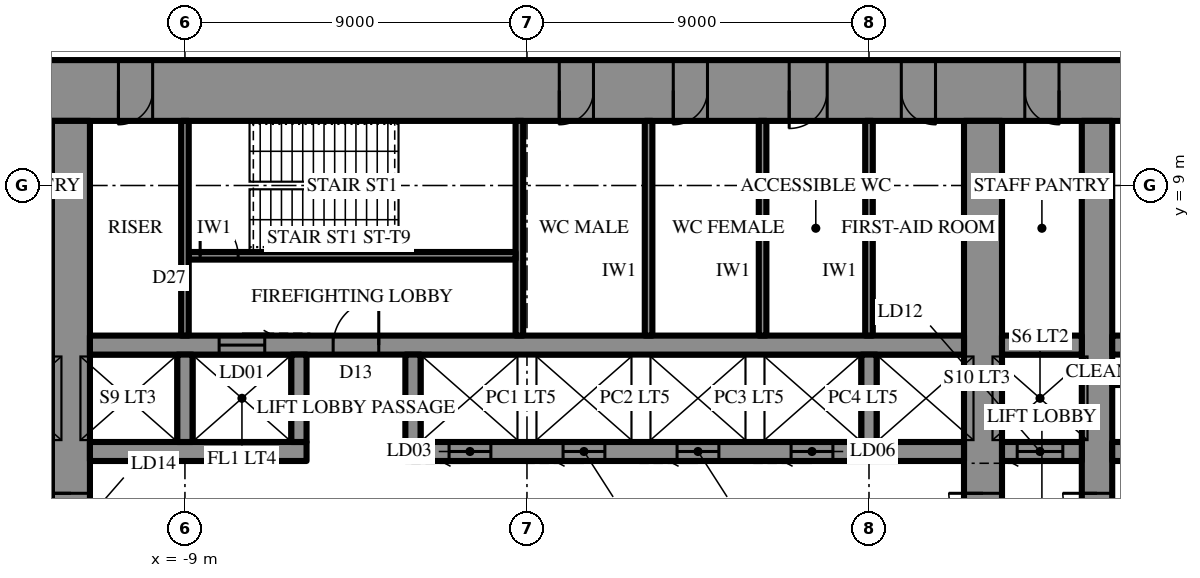
"""IFC4 building model, lengths in metres.
Left out: names, types, materials, properties, quantities, classifications, styles, units other than length and angle.
Written with IfcOpenShell. Run it as: python <this file> out.ifc"""

import sys

from ifc_helpers import new_model, si_unit, direction, frame, frame_2d, origin, place, context, subcontext, project, spatial, rectangle, extrude, element, fill, save


model = new_model("IFC4")
c1 = context("Model", 3, precision=1e-05, world=origin(), true_north=direction((0.0, 1.0)))
c2 = subcontext(c1, "Body", "Model", "MODEL_VIEW")
j1 = project(units=[si_unit("LENGTHUNIT", "METRE"), si_unit("PLANEANGLEUNIT", "RADIAN")], contexts=[c1])
p1 = place(None, origin())
s1 = spatial("IfcSite", under=j1, at=p1, CompositionType="ELEMENT")
p2 = place(p1, origin())
s2 = spatial("IfcBuilding", under=s1, at=p2, CompositionType="ELEMENT")
p3 = place(p2, frame((0.0, 0.0, 210.5)))
s3 = spatial("IfcBuildingStorey", under=s2, at=p3, CompositionType="ELEMENT", Elevation=210.5)
p4 = place(p3, frame((-18.6, 11.5, 0.0), z_axis=(0.0, 0.0, 1.0), x_axis=(1.0, 0.0, 0.0)))
e1 = element("IfcWall", 1, at=p4, inside=s3, PredefinedType="SHEAR", context=c2, shape_type="SweptSolid", body=[
    extrude(rectangle(XDim=37.2, YDim=1.6, at=frame_2d((18.6, 0.0))), origin(), (0.0, 0.0, 1.0), 5.0),
])
p5 = place(p4, frame((19.45, 0.0, 0.0)))
e2 = element("IfcOpeningElement", 2, at=p5, cuts=e1, PredefinedType="OPENING", context=c2, shape_type="SweptSolid", body=[
    extrude(rectangle(XDim=0.9, YDim=2.2, at=frame_2d((0.45, 1.1))), frame((0.0, 0.81, 0.0), z_axis=(0.0, -1.0, 0.0), x_axis=(1.0, 0.0, 0.0)), (0.0, 0.0, 1.0), 1.62),
])
p6 = place(p4, frame((22.45, 0.0, 0.0)))
e3 = element("IfcOpeningElement", 3, at=p6, cuts=e1, PredefinedType="OPENING", context=c2, shape_type="SweptSolid", body=[
    extrude(rectangle(XDim=0.9, YDim=2.2, at=frame_2d((0.45, 1.1))), frame((0.0, 0.81, 0.0), z_axis=(0.0, -1.0, 0.0), x_axis=(1.0, 0.0, 0.0)), (0.0, 0.0, 1.0), 1.62),
])
p7 = place(p4, frame((25.5, 0.0, 0.0)))
e4 = element("IfcOpeningElement", 4, at=p7, cuts=e1, PredefinedType="OPENING", context=c2, shape_type="SweptSolid", body=[
    extrude(rectangle(XDim=1.0, YDim=2.2, at=frame_2d((0.5, 1.1))), frame((0.0, 0.81, 0.0), z_axis=(0.0, -1.0, 0.0), x_axis=(1.0, 0.0, 0.0)), (0.0, 0.0, 1.0), 1.62),
])
p8 = place(p4, frame((1.75, 0.0, 0.0)))
e5 = element("IfcOpeningElement", 5, at=p8, cuts=e1, PredefinedType="OPENING", context=c2, shape_type="SweptSolid", body=[
    extrude(rectangle(XDim=0.9, YDim=2.2, at=frame_2d((0.45, 1.1))), frame((0.0, 0.81, 0.0), z_axis=(0.0, -1.0, 0.0), x_axis=(1.0, 0.0, 0.0)), (0.0, 0.0, 1.0), 1.62),
])
p9 = place(p4, frame((4.6, 0.0, 0.0)))
e6 = element("IfcOpeningElement", 6, at=p9, cuts=e1, PredefinedType="OPENING", context=c2, shape_type="SweptSolid", body=[
    extrude(rectangle(XDim=0.9, YDim=2.2, at=frame_2d((0.45, 1.1))), frame((0.0, 0.81, 0.0), z_axis=(0.0, -1.0, 0.0), x_axis=(1.0, 0.0, 0.0)), (0.0, 0.0, 1.0), 1.62),
])
p10 = place(p4, frame((7.85, 0.0, 0.0)))
e7 = element("IfcOpeningElement", 7, at=p10, cuts=e1, PredefinedType="OPENING", context=c2, shape_type="SweptSolid", body=[
    extrude(rectangle(XDim=0.9, YDim=2.2, at=frame_2d((0.45, 1.1))), frame((0.0, 0.81, 0.0), z_axis=(0.0, -1.0, 0.0), x_axis=(1.0, 0.0, 0.0)), (0.0, 0.0, 1.0), 1.62),
])
p11 = place(p4, frame((28.45, 0.0, 0.0)))
e8 = element("IfcOpeningElement", 8, at=p11, cuts=e1, PredefinedType="OPENING", context=c2, shape_type="SweptSolid", body=[
    extrude(rectangle(XDim=0.9, YDim=2.2, at=frame_2d((0.45, 1.1))), frame((0.0, 0.81, 0.0), z_axis=(0.0, -1.0, 0.0), x_axis=(1.0, 0.0, 0.0)), (0.0, 0.0, 1.0), 1.62),
])
p12 = place(p4, frame((31.7, 0.0, 0.0)))
e9 = element("IfcOpeningElement", 9, at=p12, cuts=e1, PredefinedType="OPENING", context=c2, shape_type="SweptSolid", body=[
    extrude(rectangle(XDim=0.9, YDim=2.2, at=frame_2d((0.45, 1.1))), frame((0.0, 0.81, 0.0), z_axis=(0.0, -1.0, 0.0), x_axis=(1.0, 0.0, 0.0)), (0.0, 0.0, 1.0), 1.62),
])
p13 = place(p4, frame((34.55, 0.0, 0.0)))
e10 = element("IfcOpeningElement", 10, at=p13, cuts=e1, PredefinedType="OPENING", context=c2, shape_type="SweptSolid", body=[
    extrude(rectangle(XDim=0.9, YDim=2.2, at=frame_2d((0.45, 1.1))), frame((0.0, 0.81, 0.0), z_axis=(0.0, -1.0, 0.0), x_axis=(1.0, 0.0, 0.0)), (0.0, 0.0, 1.0), 1.62),
])
p14 = place(p3, frame((12.0, -10.7, 0.0), z_axis=(0.0, 0.0, 1.0), x_axis=(0.0, 1.0, 0.0)))
e11 = element("IfcWall", 11, at=p14, inside=s3, PredefinedType="SHEAR", context=c2, shape_type="SweptSolid", body=[
    extrude(rectangle(XDim=21.4, YDim=1.0, at=frame_2d((10.7, 0.0))), origin(), (0.0, 0.0, 1.0), 5.0),
])
p15 = place(p14, frame((9.8, 0.0, 0.0)))
e12 = element("IfcOpeningElement", 12, at=p15, cuts=e11, PredefinedType="OPENING", context=c2, shape_type="SweptSolid", body=[
    extrude(rectangle(XDim=1.8, YDim=2.4, at=frame_2d((0.9, 1.2))), frame((0.0, 0.51, 0.0), z_axis=(0.0, -1.0, 0.0), x_axis=(1.0, 0.0, 0.0)), (0.0, 0.0, 1.0), 1.02),
])
p16 = place(p3, frame((-12.0, -10.7, 0.0), z_axis=(0.0, 0.0, 1.0), x_axis=(0.0, 1.0, 0.0)))
e13 = element("IfcWall", 13, at=p16, inside=s3, PredefinedType="SHEAR", context=c2, shape_type="SweptSolid", body=[
    extrude(rectangle(XDim=21.4, YDim=1.0, at=frame_2d((10.7, 0.0))), origin(), (0.0, 0.0, 1.0), 5.0),
])
p17 = place(p16, frame((9.8, 0.0, 0.0)))
e14 = element("IfcOpeningElement", 14, at=p17, cuts=e13, PredefinedType="OPENING", context=c2, shape_type="SweptSolid", body=[
    extrude(rectangle(XDim=1.8, YDim=2.4, at=frame_2d((0.9, 1.2))), frame((0.0, 0.51, 0.0), z_axis=(0.0, -1.0, 0.0), x_axis=(1.0, 0.0, 0.0)), (0.0, 0.0, 1.0), 1.02),
])
p18 = place(p3, frame((15.0, -10.7, 0.0), z_axis=(0.0, 0.0, 1.0), x_axis=(0.0, 1.0, 0.0)))
e15 = element("IfcWall", 15, at=p18, inside=s3, PredefinedType="SHEAR", context=c2, shape_type="SweptSolid", body=[
    extrude(rectangle(XDim=21.4, YDim=0.8, at=frame_2d((10.7, 0.0))), origin(), (0.0, 0.0, 1.0), 5.0),
])
p19 = place(p18, frame((9.8, 0.0, 0.0)))
e16 = element("IfcOpeningElement", 16, at=p19, cuts=e15, PredefinedType="OPENING", context=c2, shape_type="SweptSolid", body=[
    extrude(rectangle(XDim=1.8, YDim=2.4, at=frame_2d((0.9, 1.2))), frame((0.0, 0.41, 0.0), z_axis=(0.0, -1.0, 0.0), x_axis=(1.0, 0.0, 0.0)), (0.0, 0.0, 1.0), 0.82),
])
p20 = place(p3, frame((-11.5, 2.0, 0.0), z_axis=(0.0, 0.0, 1.0), x_axis=(1.0, 0.0, 0.0)))
e17 = element("IfcWall", 17, at=p20, inside=s3, PredefinedType="SHEAR", context=c2, shape_type="SweptSolid", body=[
    extrude(rectangle(XDim=5.7, YDim=0.5, at=frame_2d((2.85, 0.0))), origin(), (0.0, 0.0, 1.0), 5.0),
])
p21 = place(p3, frame((-3.2, 2.0, 0.0), z_axis=(0.0, 0.0, 1.0), x_axis=(1.0, 0.0, 0.0)))
e18 = element("IfcWall", 18, at=p21, inside=s3, PredefinedType="SHEAR", context=c2, shape_type="SweptSolid", body=[
    extrude(rectangle(XDim=14.7, YDim=0.5, at=frame_2d((7.35, 0.0))), origin(), (0.0, 0.0, 1.0), 5.0),
])
p22 = place(p21, frame((1.15, 0.0, 0.0)))
e19 = element("IfcOpeningElement", 19, at=p22, cuts=e18, PredefinedType="OPENING", context=c2, shape_type="SweptSolid", body=[
    extrude(rectangle(XDim=1.1, YDim=2.2, at=frame_2d((0.55, 1.1))), frame((0.0, 0.26, 0.0), z_axis=(0.0, -1.0, 0.0), x_axis=(1.0, 0.0, 0.0)), (0.0, 0.0, 1.0), 0.52),
])
p23 = place(p21, frame((4.15, 0.0, 0.0)))
e20 = element("IfcOpeningElement", 20, at=p23, cuts=e18, PredefinedType="OPENING", context=c2, shape_type="SweptSolid", body=[
    extrude(rectangle(XDim=1.1, YDim=2.2, at=frame_2d((0.55, 1.1))), frame((0.0, 0.26, 0.0), z_axis=(0.0, -1.0, 0.0), x_axis=(1.0, 0.0, 0.0)), (0.0, 0.0, 1.0), 0.52),
])
p24 = place(p21, frame((7.15, 0.0, 0.0)))
e21 = element("IfcOpeningElement", 21, at=p24, cuts=e18, PredefinedType="OPENING", context=c2, shape_type="SweptSolid", body=[
    extrude(rectangle(XDim=1.1, YDim=2.2, at=frame_2d((0.55, 1.1))), frame((0.0, 0.26, 0.0), z_axis=(0.0, -1.0, 0.0), x_axis=(1.0, 0.0, 0.0)), (0.0, 0.0, 1.0), 0.52),
])
p25 = place(p21, frame((10.15, 0.0, 0.0)))
e22 = element("IfcOpeningElement", 22, at=p25, cuts=e18, PredefinedType="OPENING", context=c2, shape_type="SweptSolid", body=[
    extrude(rectangle(XDim=1.1, YDim=2.2, at=frame_2d((0.55, 1.1))), frame((0.0, 0.26, 0.0), z_axis=(0.0, -1.0, 0.0), x_axis=(1.0, 0.0, 0.0)), (0.0, 0.0, 1.0), 0.52),
])
p26 = place(p3, frame((12.5, 2.0, 0.0), z_axis=(0.0, 0.0, 1.0), x_axis=(1.0, 0.0, 0.0)))
e23 = element("IfcWall", 23, at=p26, inside=s3, PredefinedType="SHEAR", context=c2, shape_type="SweptSolid", body=[
    extrude(rectangle(XDim=2.1, YDim=0.5, at=frame_2d((1.05, 0.0))), origin(), (0.0, 0.0, 1.0), 5.0),
])
p27 = place(p26, frame((0.4, 0.0, 0.0)))
e24 = element("IfcOpeningElement", 24, at=p27, cuts=e23, PredefinedType="OPENING", context=c2, shape_type="SweptSolid", body=[
    extrude(rectangle(XDim=1.2, YDim=2.2, at=frame_2d((0.6, 1.1))), frame((0.0, 0.26, 0.0), z_axis=(0.0, -1.0, 0.0), x_axis=(1.0, 0.0, 0.0)), (0.0, 0.0, 1.0), 0.52),
])
p28 = place(p3, frame((15.4, 2.0, 0.0), z_axis=(0.0, 0.0, 1.0), x_axis=(1.0, 0.0, 0.0)))
e25 = element("IfcWall", 25, at=p28, inside=s3, PredefinedType="SHEAR", context=c2, shape_type="SweptSolid", body=[
    extrude(rectangle(XDim=2.0, YDim=0.5, at=frame_2d((1.0, 0.0))), origin(), (0.0, 0.0, 1.0), 5.0),
])
p29 = place(p28, frame((0.55, 0.0, 0.0)))
e26 = element("IfcOpeningElement", 26, at=p29, cuts=e25, PredefinedType="OPENING", context=c2, shape_type="SweptSolid", body=[
    extrude(rectangle(XDim=0.9, YDim=2.2, at=frame_2d((0.45, 1.1))), frame((0.0, 0.26, 0.0), z_axis=(0.0, -1.0, 0.0), x_axis=(1.0, 0.0, 0.0)), (0.0, 0.0, 1.0), 0.52),
])
p30 = place(p3, frame((-11.5, 4.8, 0.0), z_axis=(0.0, 0.0, 1.0), x_axis=(1.0, 0.0, 0.0)))
e27 = element("IfcWall", 27, at=p30, inside=s3, PredefinedType="SHEAR", context=c2, shape_type="SweptSolid", body=[
    extrude(rectangle(XDim=23.0, YDim=0.5, at=frame_2d((11.5, 0.0))), origin(), (0.0, 0.0, 1.0), 5.0),
])
p31 = place(p30, frame((6.4, 0.0, 0.0)))
e28 = element("IfcOpeningElement", 28, at=p31, cuts=e27, PredefinedType="OPENING", context=c2, shape_type="SweptSolid", body=[
    extrude(rectangle(XDim=1.2, YDim=2.2, at=frame_2d((0.6, 1.1))), frame((0.0, 0.26, 0.0), z_axis=(0.0, -1.0, 0.0), x_axis=(1.0, 0.0, 0.0)), (0.0, 0.0, 1.0), 0.52),
])
p32 = place(p30, frame((3.4, 0.0, 0.0)))
e29 = element("IfcOpeningElement", 29, at=p32, cuts=e27, PredefinedType="OPENING", context=c2, shape_type="SweptSolid", body=[
    extrude(rectangle(XDim=1.2, YDim=2.2, at=frame_2d((0.6, 1.1))), frame((0.0, 0.26, 0.0), z_axis=(0.0, -1.0, 0.0), x_axis=(1.0, 0.0, 0.0)), (0.0, 0.0, 1.0), 0.52),
])
p33 = place(p3, frame((12.5, 4.8, 0.0), z_axis=(0.0, 0.0, 1.0), x_axis=(1.0, 0.0, 0.0)))
e30 = element("IfcWall", 30, at=p33, inside=s3, PredefinedType="SHEAR", context=c2, shape_type="SweptSolid", body=[
    extrude(rectangle(XDim=2.1, YDim=0.5, at=frame_2d((1.05, 0.0))), origin(), (0.0, 0.0, 1.0), 5.0),
])
p34 = place(p3, frame((15.4, 4.8, 0.0), z_axis=(0.0, 0.0, 1.0), x_axis=(1.0, 0.0, 0.0)))
e31 = element("IfcWall", 31, at=p34, inside=s3, PredefinedType="SHEAR", context=c2, shape_type="SweptSolid", body=[
    extrude(rectangle(XDim=2.0, YDim=0.5, at=frame_2d((1.0, 0.0))), origin(), (0.0, 0.0, 1.0), 5.0),
])
for number, where, z_axis, x_axis in (
    (32, (-9.0, 2.25, 0.0), (0.0, 0.0, 1.0), (0.0, 1.0, 0.0)),
    (33, (-6.0, 2.25, 0.0), (0.0, 0.0, 1.0), (0.0, 1.0, 0.0)),
    (34, (-3.0, 2.25, 0.0), (0.0, 0.0, 1.0), (0.0, 1.0, 0.0)),
    (35, (9.0, 2.25, 0.0), (0.0, 0.0, 1.0), (0.0, 1.0, 0.0)),
):
    element("IfcWall", number, at=place(p3, frame(where, z_axis=z_axis, x_axis=x_axis)), inside=s3, PredefinedType="SHEAR", context=c2, shape_type="SweptSolid", body=[
        extrude(rectangle(XDim=2.3, YDim=0.4, at=frame_2d((1.15, 0.0))), origin(), (0.0, 0.0, 1.0), 5.0),
    ])
p35 = place(p3, frame((-0.2, 5.05, 0.0), z_axis=(0.0, 0.0, 1.0), x_axis=(0.0, 1.0, 0.0)))
e36 = element("IfcWall", 36, at=p35, inside=s3, PredefinedType="SHEAR", context=c2, shape_type="SweptSolid", body=[
    extrude(rectangle(XDim=5.65, YDim=0.2, at=frame_2d((2.825, 0.0))), origin(), (0.0, 0.0, 1.0), 5.0),
])
p36 = place(p3, frame((-8.9, 7.15, 0.0), z_axis=(0.0, 0.0, 1.0), x_axis=(1.0, 0.0, 0.0)))
e37 = element("IfcWall", 37, at=p36, inside=s3, PredefinedType="SHEAR", context=c2, shape_type="SweptSolid", body=[
    extrude(rectangle(XDim=8.6, YDim=0.2, at=frame_2d((4.3, 0.0))), origin(), (0.0, 0.0, 1.0), 5.0),
])
p37 = place(p36, frame((0.3, 0.0, 0.0)))
e38 = element("IfcOpeningElement", 38, at=p37, cuts=e37, PredefinedType="OPENING", context=c2, shape_type="SweptSolid", body=[
    extrude(rectangle(XDim=1.0, YDim=2.2, at=frame_2d((0.5, 1.1))), frame((0.0, 0.11, 0.0), z_axis=(0.0, -1.0, 0.0), x_axis=(1.0, 0.0, 0.0)), (0.0, 0.0, 1.0), 0.22),
])
for number, where, z_axis, x_axis in (
    (39, (-9.0, 5.05, 0.0), (0.0, 0.0, 1.0), (0.0, 1.0, 0.0)),
    (40, (9.0, 5.05, 0.0), (0.0, 0.0, 1.0), (0.0, 1.0, 0.0)),
    (41, (3.2, 5.05, 0.0), (0.0, 0.0, 1.0), (0.0, 1.0, 0.0)),
    (42, (6.2, 5.05, 0.0), (0.0, 0.0, 1.0), (0.0, 1.0, 0.0)),
):
    element("IfcWall", number, at=place(p3, frame(where, z_axis=z_axis, x_axis=x_axis)), inside=s3, PredefinedType="PARTITIONING", context=c2, shape_type="SweptSolid", body=[
        extrude(rectangle(XDim=5.65, YDim=0.2, at=frame_2d((2.825, 0.0))), origin(), (0.0, 0.0, 1.0), 4.8),
    ])
p38 = place(p3, frame((15.4, 3.85, 0.0), z_axis=(0.0, 0.0, 1.0), x_axis=(1.0, 0.0, 0.0)))
e43 = element("IfcWall", 43, at=p38, inside=s3, PredefinedType="PARTITIONING", context=c2, shape_type="SweptSolid", body=[
    extrude(rectangle(XDim=2.0, YDim=0.2, at=frame_2d((1.0, 0.0))), origin(), (0.0, 0.0, 1.0), 4.8),
])
p39 = place(p31, origin())
e44 = element("IfcDoor", 44, at=p39, inside=s3, OperationType="SINGLE_SWING_LEFT", PredefinedType="DOOR", context=c2, shape_type="SweptSolid", body=[
    extrude(rectangle(XDim=1.2, YDim=2.2, at=frame_2d((0.6, 1.1))), frame((0.0, 0.025, 0.0), z_axis=(0.0, -1.0, 0.0), x_axis=(1.0, 0.0, 0.0)), (0.0, 0.0, 1.0), 0.05),
])
fill(e28, e44)
p40 = place(p37, origin())
e45 = element("IfcDoor", 45, at=p40, inside=s3, OperationType="SINGLE_SWING_RIGHT", PredefinedType="DOOR", context=c2, shape_type="SweptSolid", body=[
    extrude(rectangle(XDim=1.0, YDim=2.2, at=frame_2d((0.5, 1.1))), frame((0.0, 0.025, 0.0), z_axis=(0.0, -1.0, 0.0), x_axis=(1.0, 0.0, 0.0)), (0.0, 0.0, 1.0), 0.05),
])
fill(e38, e45)
p41 = place(p5, frame((0.9, 0.0, 0.0), z_axis=(0.0, 0.0, 1.0), x_axis=(-1.0, 0.0, 0.0)))
e46 = element("IfcDoor", 46, at=p41, inside=s3, OperationType="SINGLE_SWING_LEFT", PredefinedType="DOOR", context=c2, shape_type="SweptSolid", body=[
    extrude(rectangle(XDim=0.9, YDim=2.2, at=frame_2d((0.45, 1.1))), frame((0.0, 0.025, 0.0), z_axis=(0.0, -1.0, 0.0), x_axis=(1.0, 0.0, 0.0)), (0.0, 0.0, 1.0), 0.05),
])
fill(e2, e46)
p42 = place(p6, frame((0.9, 0.0, 0.0), z_axis=(0.0, 0.0, 1.0), x_axis=(-1.0, 0.0, 0.0)))
e47 = element("IfcDoor", 47, at=p42, inside=s3, OperationType="SINGLE_SWING_LEFT", PredefinedType="DOOR", context=c2, shape_type="SweptSolid", body=[
    extrude(rectangle(XDim=0.9, YDim=2.2, at=frame_2d((0.45, 1.1))), frame((0.0, 0.025, 0.0), z_axis=(0.0, -1.0, 0.0), x_axis=(1.0, 0.0, 0.0)), (0.0, 0.0, 1.0), 0.05),
])
fill(e3, e47)
p43 = place(p7, frame((1.0, 0.0, 0.0), z_axis=(0.0, 0.0, 1.0), x_axis=(-1.0, 0.0, 0.0)))
e48 = element("IfcDoor", 48, at=p43, inside=s3, OperationType="SINGLE_SWING_LEFT", PredefinedType="DOOR", context=c2, shape_type="SweptSolid", body=[
    extrude(rectangle(XDim=1.0, YDim=2.2, at=frame_2d((0.5, 1.1))), frame((0.0, 0.025, 0.0), z_axis=(0.0, -1.0, 0.0), x_axis=(1.0, 0.0, 0.0)), (0.0, 0.0, 1.0), 0.05),
])
fill(e4, e48)
p44 = place(p10, frame((0.9, 0.0, 0.0), z_axis=(0.0, 0.0, 1.0), x_axis=(-1.0, 0.0, 0.0)))
e49 = element("IfcDoor", 49, at=p44, inside=s3, OperationType="SINGLE_SWING_LEFT", PredefinedType="DOOR", context=c2, shape_type="SweptSolid", body=[
    extrude(rectangle(XDim=0.9, YDim=2.2, at=frame_2d((0.45, 1.1))), frame((0.0, 0.025, 0.0), z_axis=(0.0, -1.0, 0.0), x_axis=(1.0, 0.0, 0.0)), (0.0, 0.0, 1.0), 0.05),
])
fill(e7, e49)
p45 = place(p11, frame((0.9, 0.0, 0.0), z_axis=(0.0, 0.0, 1.0), x_axis=(-1.0, 0.0, 0.0)))
e50 = element("IfcDoor", 50, at=p45, inside=s3, OperationType="SINGLE_SWING_RIGHT", PredefinedType="DOOR", context=c2, shape_type="SweptSolid", body=[
    extrude(rectangle(XDim=0.9, YDim=2.2, at=frame_2d((0.45, 1.1))), frame((0.0, 0.025, 0.0), z_axis=(0.0, -1.0, 0.0), x_axis=(1.0, 0.0, 0.0)), (0.0, 0.0, 1.0), 0.05),
])
fill(e8, e50)
p46 = place(p12, frame((0.9, 0.0, 0.0), z_axis=(0.0, 0.0, 1.0), x_axis=(-1.0, 0.0, 0.0)))
e51 = element("IfcDoor", 51, at=p46, inside=s3, OperationType="SINGLE_SWING_RIGHT", PredefinedType="DOOR", context=c2, shape_type="SweptSolid", body=[
    extrude(rectangle(XDim=0.9, YDim=2.2, at=frame_2d((0.45, 1.1))), frame((0.0, 0.025, 0.0), z_axis=(0.0, -1.0, 0.0), x_axis=(1.0, 0.0, 0.0)), (0.0, 0.0, 1.0), 0.05),
])
fill(e9, e51)
p47 = place(p15, origin())
e52 = element("IfcDoor", 52, at=p47, inside=s3, OperationType="DOUBLE_DOOR_SINGLE_SWING", PredefinedType="DOOR", context=c2, shape_type="SweptSolid", body=[
    extrude(rectangle(XDim=1.8, YDim=2.4, at=frame_2d((0.9, 1.2))), frame((0.0, 0.025, 0.0), z_axis=(0.0, -1.0, 0.0), x_axis=(1.0, 0.0, 0.0)), (0.0, 0.0, 1.0), 0.05),
])
fill(e12, e52)
p48 = place(p17, origin())
e53 = element("IfcDoor", 53, at=p48, inside=s3, OperationType="DOUBLE_DOOR_SINGLE_SWING", PredefinedType="DOOR", context=c2, shape_type="SweptSolid", body=[
    extrude(rectangle(XDim=1.8, YDim=2.4, at=frame_2d((0.9, 1.2))), frame((0.0, 0.025, 0.0), z_axis=(0.0, -1.0, 0.0), x_axis=(1.0, 0.0, 0.0)), (0.0, 0.0, 1.0), 0.05),
])
fill(e14, e53)
p49 = place(p19, origin())
e54 = element("IfcDoor", 54, at=p49, inside=s3, OperationType="DOUBLE_DOOR_SINGLE_SWING", PredefinedType="DOOR", context=c2, shape_type="SweptSolid", body=[
    extrude(rectangle(XDim=1.8, YDim=2.4, at=frame_2d((0.9, 1.2))), frame((0.0, 0.025, 0.0), z_axis=(0.0, -1.0, 0.0), x_axis=(1.0, 0.0, 0.0)), (0.0, 0.0, 1.0), 0.05),
])
fill(e16, e54)
p50 = place(p32, origin())
e55 = element("IfcDoor", 55, at=p50, inside=s3, OperationType="SLIDING_TO_LEFT", PredefinedType="DOOR", context=c2, shape_type="SweptSolid", body=[
    extrude(rectangle(XDim=1.2, YDim=2.2, at=frame_2d((0.6, 1.1))), frame((0.0, 0.025, 0.0), z_axis=(0.0, -1.0, 0.0), x_axis=(1.0, 0.0, 0.0)), (0.0, 0.0, 1.0), 0.05),
])
fill(e29, e55)
p51 = place(p22, frame((1.1, 0.0, 0.0), z_axis=(0.0, 0.0, 1.0), x_axis=(-1.0, 0.0, 0.0)))
e56 = element("IfcDoor", 56, at=p51, inside=s3, OperationType="SLIDING_TO_LEFT", PredefinedType="DOOR", context=c2, shape_type="SweptSolid", body=[
    extrude(rectangle(XDim=1.1, YDim=2.2, at=frame_2d((0.55, 1.1))), frame((0.0, 0.025, 0.0), z_axis=(0.0, -1.0, 0.0), x_axis=(1.0, 0.0, 0.0)), (0.0, 0.0, 1.0), 0.05),
])
fill(e19, e56)
p52 = place(p23, frame((1.1, 0.0, 0.0), z_axis=(0.0, 0.0, 1.0), x_axis=(-1.0, 0.0, 0.0)))
e57 = element("IfcDoor", 57, at=p52, inside=s3, OperationType="SLIDING_TO_LEFT", PredefinedType="DOOR", context=c2, shape_type="SweptSolid", body=[
    extrude(rectangle(XDim=1.1, YDim=2.2, at=frame_2d((0.55, 1.1))), frame((0.0, 0.025, 0.0), z_axis=(0.0, -1.0, 0.0), x_axis=(1.0, 0.0, 0.0)), (0.0, 0.0, 1.0), 0.05),
])
fill(e20, e57)
p53 = place(p24, frame((1.1, 0.0, 0.0), z_axis=(0.0, 0.0, 1.0), x_axis=(-1.0, 0.0, 0.0)))
e58 = element("IfcDoor", 58, at=p53, inside=s3, OperationType="SLIDING_TO_LEFT", PredefinedType="DOOR", context=c2, shape_type="SweptSolid", body=[
    extrude(rectangle(XDim=1.1, YDim=2.2, at=frame_2d((0.55, 1.1))), frame((0.0, 0.025, 0.0), z_axis=(0.0, -1.0, 0.0), x_axis=(1.0, 0.0, 0.0)), (0.0, 0.0, 1.0), 0.05),
])
fill(e21, e58)
p54 = place(p25, frame((1.1, 0.0, 0.0), z_axis=(0.0, 0.0, 1.0), x_axis=(-1.0, 0.0, 0.0)))
e59 = element("IfcDoor", 59, at=p54, inside=s3, OperationType="SLIDING_TO_LEFT", PredefinedType="DOOR", context=c2, shape_type="SweptSolid", body=[
    extrude(rectangle(XDim=1.1, YDim=2.2, at=frame_2d((0.55, 1.1))), frame((0.0, 0.025, 0.0), z_axis=(0.0, -1.0, 0.0), x_axis=(1.0, 0.0, 0.0)), (0.0, 0.0, 1.0), 0.05),
])
fill(e22, e59)
p55 = place(p27, frame((1.2, 0.0, 0.0), z_axis=(0.0, 0.0, 1.0), x_axis=(-1.0, 0.0, 0.0)))
e60 = element("IfcDoor", 60, at=p55, inside=s3, OperationType="SLIDING_TO_LEFT", PredefinedType="DOOR", context=c2, shape_type="SweptSolid", body=[
    extrude(rectangle(XDim=1.2, YDim=2.2, at=frame_2d((0.6, 1.1))), frame((0.0, 0.025, 0.0), z_axis=(0.0, -1.0, 0.0), x_axis=(1.0, 0.0, 0.0)), (0.0, 0.0, 1.0), 0.05),
])
fill(e24, e60)
save(model, sys.argv[1])
